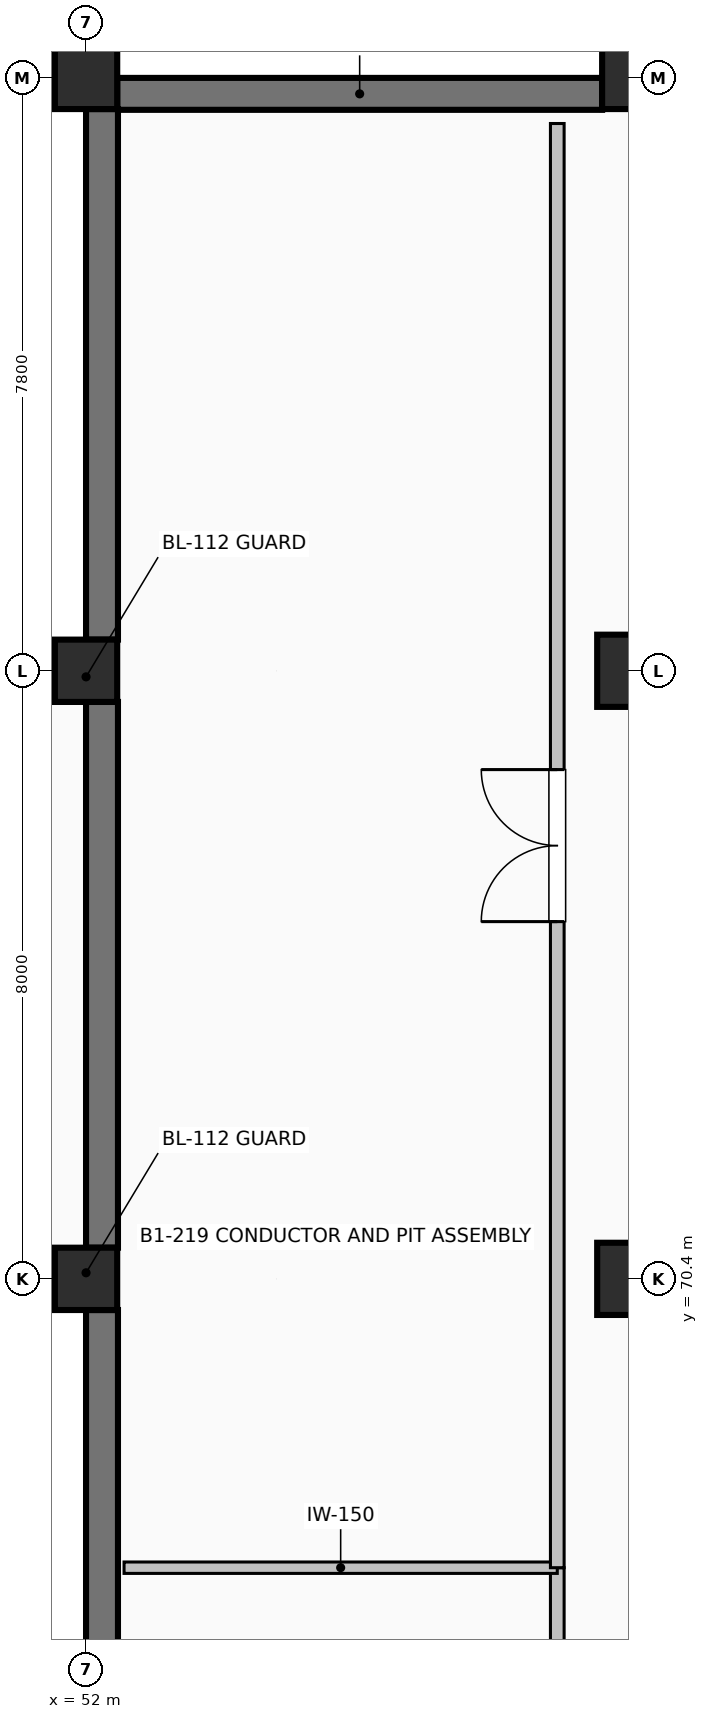
"""IFC4 building model, lengths in metres.
Left out: names, types, materials, properties, quantities, classifications, styles, units other than length and angle.
Written with IfcOpenShell. Run it as: python <this file> out.ifc"""

import sys

from ifc_helpers import new_model, si_unit, direction, frame, frame_2d, origin, origin_2d, place, context, subcontext, project, spatial, rectangle, extrude, element, fill, save


model = new_model("IFC4")
c1 = context("Model", 3, precision=1e-05, world=origin(), true_north=direction((0.0, 1.0)))
c2 = subcontext(c1, "Body", "Model", "MODEL_VIEW")
j1 = project(units=[si_unit("LENGTHUNIT", "METRE"), si_unit("PLANEANGLEUNIT", "RADIAN")], contexts=[c1])
p1 = place(None, origin())
s1 = spatial("IfcSite", under=j1, at=p1, CompositionType="ELEMENT")
p2 = place(p1, origin())
s2 = spatial("IfcBuilding", under=s1, at=p2, CompositionType="ELEMENT")
p3 = place(p2, frame((0.0, 0.0, -4.8)))
s3 = spatial("IfcBuildingStorey", under=s2, at=p3, CompositionType="ELEMENT", Elevation=-4.8)
for number, where, z_axis, x_axis in (
    (1, (52.0, 70.4, 0.0), (0.0, 0.0, 1.0), (1.0, 0.0, 0.0)),
    (2, (52.0, 78.4, 0.0), (0.0, 0.0, 1.0), (1.0, 0.0, 0.0)),
    (3, (52.0, 86.2, 0.0), (0.0, 0.0, 1.0), (1.0, 0.0, 0.0)),
):
    element("IfcColumn", number, at=place(p3, frame(where, z_axis=z_axis, x_axis=x_axis)), inside=s3, PredefinedType="COLUMN", context=c2, shape_type="SweptSolid", body=[
        extrude(rectangle(XDim=0.82, YDim=0.82, at=origin_2d()), origin(), (0.0, 0.0, 1.0), 4.8),
    ])
for number, where, z_axis, x_axis in (
    (4, (59.2, 70.4, 0.0), (0.0, 0.0, 1.0), (1.0, 0.0, 0.0)),
    (5, (59.2, 78.4, 0.0), (0.0, 0.0, 1.0), (1.0, 0.0, 0.0)),
):
    element("IfcColumn", number, at=place(p3, frame(where, z_axis=z_axis, x_axis=x_axis)), inside=s3, PredefinedType="COLUMN", context=c2, shape_type="SweptSolid", body=[
        extrude(rectangle(XDim=0.95, YDim=0.95, at=origin_2d()), origin(), (0.0, 0.0, 1.0), 4.8),
    ])
p4 = place(p3, frame((59.2, 86.2, 0.0), z_axis=(0.0, 0.0, 1.0), x_axis=(1.0, 0.0, 0.0)))
e6 = element("IfcColumn", 6, at=p4, inside=s3, PredefinedType="COLUMN", context=c2, shape_type="SweptSolid", body=[
    extrude(rectangle(XDim=0.82, YDim=0.82, at=origin_2d()), origin(), (0.0, 0.0, 1.0), 4.8),
])
p5 = place(p3, frame((52.41, 85.99, 0.0), z_axis=(0.0, 0.0, 1.0), x_axis=(1.0, 0.0, 0.0)))
e7 = element("IfcWall", 7, at=p5, inside=s3, PredefinedType="SHEAR", context=c2, shape_type="SweptSolid", body=[
    extrude(rectangle(XDim=6.38, YDim=0.42, at=frame_2d((3.19, 0.0))), origin(), (0.0, 0.0, 1.0), 4.5),
])
p6 = place(p3, frame((52.21, 62.91, 0.0), z_axis=(0.0, 0.0, 1.0), x_axis=(0.0, 1.0, 0.0)))
e8 = element("IfcWall", 8, at=p6, inside=s3, PredefinedType="SHEAR", context=c2, shape_type="SweptSolid", body=[
    extrude(rectangle(XDim=7.08, YDim=0.42, at=frame_2d((3.54, 0.0))), origin(), (0.0, 0.0, 1.0), 4.5),
])
p7 = place(p3, frame((52.21, 70.81, 0.0), z_axis=(0.0, 0.0, 1.0), x_axis=(0.0, 1.0, 0.0)))
e9 = element("IfcWall", 9, at=p7, inside=s3, PredefinedType="SHEAR", context=c2, shape_type="SweptSolid", body=[
    extrude(rectangle(XDim=7.18, YDim=0.42, at=frame_2d((3.59, 0.0))), origin(), (0.0, 0.0, 1.0), 4.5),
])
p8 = place(p3, frame((52.21, 78.81, 0.0), z_axis=(0.0, 0.0, 1.0), x_axis=(0.0, 1.0, 0.0)))
e10 = element("IfcWall", 10, at=p8, inside=s3, PredefinedType="SHEAR", context=c2, shape_type="SweptSolid", body=[
    extrude(rectangle(XDim=6.98, YDim=0.42, at=frame_2d((3.49, 0.0))), origin(), (0.0, 0.0, 1.0), 4.5),
])
p9 = place(p3, frame((58.2, 47.6, 0.0), z_axis=(0.0, 0.0, 1.0), x_axis=(0.0, 1.0, 0.0)))
e11 = element("IfcWall", 11, at=p9, inside=s3, PredefinedType="PARTITIONING", context=c2, shape_type="SweptSolid", body=[
    extrude(rectangle(XDim=19.0, YDim=0.18, at=frame_2d((9.5, 0.0))), origin(), (0.0, 0.0, 1.0), 4.472),
])
p10 = place(p9, frame((8.675, 0.0, 0.0)))
e12 = element("IfcOpeningElement", 12, at=p10, cuts=e11, PredefinedType="OPENING", context=c2, shape_type="SweptSolid", body=[
    extrude(rectangle(XDim=1.65, YDim=2.2, at=frame_2d((0.825, 1.1))), frame((0.0, 0.1, 0.0), z_axis=(0.0, -1.0, 0.0), x_axis=(1.0, 0.0, 0.0)), (0.0, 0.0, 1.0), 0.2),
])
p11 = place(p3, frame((52.5, 66.6, 0.0), z_axis=(0.0, 0.0, 1.0), x_axis=(1.0, 0.0, 0.0)))
e13 = element("IfcWall", 13, at=p11, inside=s3, PredefinedType="PARTITIONING", context=c2, shape_type="SweptSolid", body=[
    extrude(rectangle(XDim=5.7, YDim=0.15, at=frame_2d((2.85, 0.0))), origin(), (0.0, 0.0, 1.0), 4.472),
])
p12 = place(p3, frame((58.2, 66.6, 0.0), z_axis=(0.0, 0.0, 1.0), x_axis=(0.0, 1.0, 0.0)))
e14 = element("IfcWall", 14, at=p12, inside=s3, PredefinedType="PARTITIONING", context=c2, shape_type="SweptSolid", body=[
    extrude(rectangle(XDim=19.0, YDim=0.18, at=frame_2d((9.5, 0.0))), origin(), (0.0, 0.0, 1.0), 4.472),
])
p13 = place(p12, frame((8.5, 0.0, 0.0)))
e15 = element("IfcOpeningElement", 15, at=p13, cuts=e14, PredefinedType="OPENING", context=c2, shape_type="SweptSolid", body=[
    extrude(rectangle(XDim=2.0, YDim=2.28, at=frame_2d((1.0, 1.14))), frame((0.0, 0.1, 0.0), z_axis=(0.0, -1.0, 0.0), x_axis=(1.0, 0.0, 0.0)), (0.0, 0.0, 1.0), 0.2),
])
p14 = place(p13, origin())
e16 = element("IfcDoor", 16, at=p14, inside=s3, OperationType="DOUBLE_DOOR_SINGLE_SWING", PredefinedType="DOOR", context=c2, shape_type="SweptSolid", body=[
    extrude(rectangle(XDim=2.0, YDim=2.28, at=frame_2d((1.0, 1.14))), frame((0.0, 0.025, 0.0), z_axis=(0.0, -1.0, 0.0), x_axis=(1.0, 0.0, 0.0)), (0.0, 0.0, 1.0), 0.05),
])
fill(e15, e16)
save(model, sys.argv[1])
